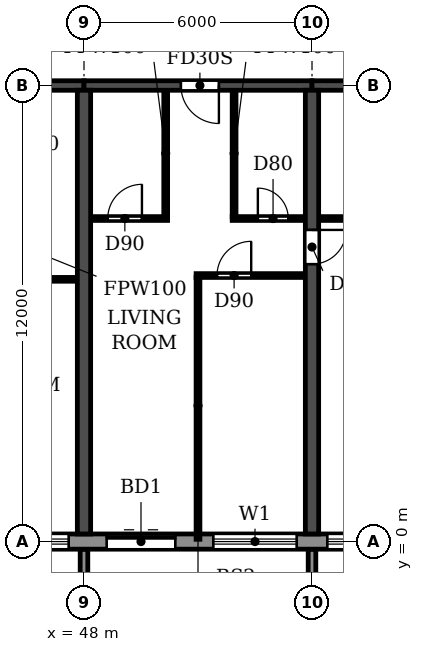
"""IFC4 building model, lengths in metres.
Left out: names, types, materials, properties, quantities, classifications, styles, units other than length and angle.
Written with IfcOpenShell. Run it as: python <this file> out.ifc"""

import sys

from ifc_helpers import new_model, si_unit, direction, frame, frame_2d, origin, place, context, subcontext, project, spatial, polyline, rectangle, outline, extrude, source, transform, mapped, element, fill, save


model = new_model("IFC4")
c1 = context("Model", 3, precision=1e-05, world=origin(), true_north=direction((0.0, 1.0)))
c2 = subcontext(c1, "Body", "Model", "MODEL_VIEW")
j1 = project(units=[si_unit("LENGTHUNIT", "METRE"), si_unit("PLANEANGLEUNIT", "RADIAN")], contexts=[c1])
p1 = place(None, origin())
s1 = spatial("IfcSite", under=j1, at=p1, CompositionType="ELEMENT")
p2 = place(p1, origin())
s2 = spatial("IfcBuilding", under=s1, at=p2, CompositionType="ELEMENT")
p3 = place(p2, frame((0.0, 0.0, 109.2)))
s3 = spatial("IfcBuildingStorey", under=s2, at=p3, CompositionType="ELEMENT", Elevation=109.2)
p4 = place(p3, frame((48.0, 0.2, 0.0), z_axis=(0.0, 0.0, 1.0), x_axis=(0.0, 1.0, 0.0)))
e1 = element("IfcWall", 1, at=p4, inside=s3, PredefinedType="SHEAR", context=c2, shape_type="SweptSolid", body=[
    extrude(rectangle(XDim=11.675, YDim=0.35, at=frame_2d((5.837, 0.0))), origin(), (0.0, 0.0, 1.0), 3.06),
])
p5 = place(p3, frame((54.0, 0.2, 0.0), z_axis=(0.0, 0.0, 1.0), x_axis=(0.0, 1.0, 0.0)))
e2 = element("IfcWall", 2, at=p5, inside=s3, PredefinedType="SHEAR", context=c2, shape_type="SweptSolid", body=[
    extrude(rectangle(XDim=11.675, YDim=0.35, at=frame_2d((5.837, 0.0))), origin(), (0.0, 0.0, 1.0), 3.06),
])
p6 = place(p5, frame((7.1, 0.0, 0.0)))
e3 = element("IfcOpeningElement", 3, at=p6, cuts=e2, PredefinedType="OPENING", context=c2, shape_type="SweptSolid", body=[
    extrude(rectangle(XDim=0.9, YDim=2.1, at=frame_2d((0.45, 1.05))), frame((0.0, 0.185, 0.0), z_axis=(0.0, -1.0, 0.0), x_axis=(1.0, 0.0, 0.0)), (0.0, 0.0, 1.0), 0.37),
])
p7 = place(p3, frame((42.0, 12.0, 0.0), z_axis=(0.0, 0.0, 1.0), x_axis=(1.0, 0.0, 0.0)))
e4 = element("IfcWall", 4, at=p7, inside=s3, PredefinedType="SHEAR", context=c2, shape_type="SweptSolid", body=[
    extrude(rectangle(XDim=6.0, YDim=0.25, at=frame_2d((3.0, 0.0))), origin(), (0.0, 0.0, 1.0), 2.46),
])
p8 = place(p7, frame((2.45, 0.0, 0.0)))
e5 = element("IfcOpeningElement", 5, at=p8, cuts=e4, PredefinedType="OPENING", context=c2, shape_type="SweptSolid", body=[
    extrude(rectangle(XDim=1.0, YDim=2.1, at=frame_2d((0.5, 1.05))), frame((0.0, 0.135, 0.0), z_axis=(0.0, -1.0, 0.0), x_axis=(1.0, 0.0, 0.0)), (0.0, 0.0, 1.0), 0.27),
])
p9 = place(p3, frame((48.0, 12.0, 0.0), z_axis=(0.0, 0.0, 1.0), x_axis=(1.0, 0.0, 0.0)))
e6 = element("IfcWall", 6, at=p9, inside=s3, PredefinedType="SHEAR", context=c2, shape_type="SweptSolid", body=[
    extrude(rectangle(XDim=6.0, YDim=0.25, at=frame_2d((3.0, 0.0))), origin(), (0.0, 0.0, 1.0), 2.46),
])
p10 = place(p9, frame((2.55, 0.0, 0.0)))
e7 = element("IfcOpeningElement", 7, at=p10, cuts=e6, PredefinedType="OPENING", context=c2, shape_type="SweptSolid", body=[
    extrude(rectangle(XDim=1.0, YDim=2.1, at=frame_2d((0.5, 1.05))), frame((0.0, 0.135, 0.0), z_axis=(0.0, -1.0, 0.0), x_axis=(1.0, 0.0, 0.0)), (0.0, 0.0, 1.0), 0.27),
])
p11 = place(p3, frame((54.0, 12.0, 0.0), z_axis=(0.0, 0.0, 1.0), x_axis=(1.0, 0.0, 0.0)))
e8 = element("IfcWall", 8, at=p11, inside=s3, PredefinedType="SHEAR", context=c2, shape_type="SweptSolid", body=[
    extrude(rectangle(XDim=6.0, YDim=0.25, at=frame_2d((3.0, 0.0))), origin(), (0.0, 0.0, 1.0), 2.46),
])
p12 = place(p3, frame((16.683, 0.0, 0.0), z_axis=(0.0, 0.0, 1.0), x_axis=(1.0, 0.0, 0.0)))
e9 = element("IfcWall", 9, at=p12, inside=s3, PredefinedType="STANDARD", context=c2, shape_type="SweptSolid", body=[
    extrude(rectangle(XDim=68.634, YDim=0.4, at=frame_2d((34.317, 0.0))), origin(), (0.0, 0.0, 1.0), 3.06),
])
p13 = place(p12, frame((1.717, 0.0, 0.9)))
e10 = element("IfcOpeningElement", 10, at=p13, cuts=e9, PredefinedType="OPENING", context=c2, shape_type="SweptSolid", body=[
    extrude(rectangle(XDim=2.2, YDim=1.5, at=frame_2d((1.1, 0.75))), frame((0.0, 0.21, 0.0), z_axis=(0.0, -1.0, 0.0), x_axis=(1.0, 0.0, 0.0)), (0.0, 0.0, 1.0), 0.42),
])
p14 = place(p12, frame((4.717, 0.0, 0.9)))
e11 = element("IfcOpeningElement", 11, at=p14, cuts=e9, PredefinedType="OPENING", context=c2, shape_type="SweptSolid", body=[
    extrude(rectangle(XDim=2.2, YDim=1.5, at=frame_2d((1.1, 0.75))), frame((0.0, 0.21, 0.0), z_axis=(0.0, -1.0, 0.0), x_axis=(1.0, 0.0, 0.0)), (0.0, 0.0, 1.0), 0.42),
])
p15 = place(p12, frame((7.717, 0.0, 0.9)))
e12 = element("IfcOpeningElement", 12, at=p15, cuts=e9, PredefinedType="OPENING", context=c2, shape_type="SweptSolid", body=[
    extrude(rectangle(XDim=2.2, YDim=1.5, at=frame_2d((1.1, 0.75))), frame((0.0, 0.21, 0.0), z_axis=(0.0, -1.0, 0.0), x_axis=(1.0, 0.0, 0.0)), (0.0, 0.0, 1.0), 0.42),
])
p16 = place(p12, frame((10.917, 0.0, 0.0)))
e13 = element("IfcOpeningElement", 13, at=p16, cuts=e9, PredefinedType="OPENING", context=c2, shape_type="SweptSolid", body=[
    extrude(rectangle(XDim=1.8, YDim=2.4, at=frame_2d((0.9, 1.2))), frame((0.0, 0.21, 0.0), z_axis=(0.0, -1.0, 0.0), x_axis=(1.0, 0.0, 0.0)), (0.0, 0.0, 1.0), 0.42),
])
p17 = place(p12, frame((13.717, 0.0, 0.9)))
e14 = element("IfcOpeningElement", 14, at=p17, cuts=e9, PredefinedType="OPENING", context=c2, shape_type="SweptSolid", body=[
    extrude(rectangle(XDim=2.2, YDim=1.5, at=frame_2d((1.1, 0.75))), frame((0.0, 0.21, 0.0), z_axis=(0.0, -1.0, 0.0), x_axis=(1.0, 0.0, 0.0)), (0.0, 0.0, 1.0), 0.42),
])
p18 = place(p12, frame((16.717, 0.0, 0.9)))
e15 = element("IfcOpeningElement", 15, at=p18, cuts=e9, PredefinedType="OPENING", context=c2, shape_type="SweptSolid", body=[
    extrude(rectangle(XDim=2.2, YDim=1.5, at=frame_2d((1.1, 0.75))), frame((0.0, 0.21, 0.0), z_axis=(0.0, -1.0, 0.0), x_axis=(1.0, 0.0, 0.0)), (0.0, 0.0, 1.0), 0.42),
])
p19 = place(p12, frame((19.717, 0.0, 0.9)))
e16 = element("IfcOpeningElement", 16, at=p19, cuts=e9, PredefinedType="OPENING", context=c2, shape_type="SweptSolid", body=[
    extrude(rectangle(XDim=2.2, YDim=1.5, at=frame_2d((1.1, 0.75))), frame((0.0, 0.21, 0.0), z_axis=(0.0, -1.0, 0.0), x_axis=(1.0, 0.0, 0.0)), (0.0, 0.0, 1.0), 0.42),
])
p20 = place(p12, frame((22.717, 0.0, 0.9)))
e17 = element("IfcOpeningElement", 17, at=p20, cuts=e9, PredefinedType="OPENING", context=c2, shape_type="SweptSolid", body=[
    extrude(rectangle(XDim=2.2, YDim=1.5, at=frame_2d((1.1, 0.75))), frame((0.0, 0.21, 0.0), z_axis=(0.0, -1.0, 0.0), x_axis=(1.0, 0.0, 0.0)), (0.0, 0.0, 1.0), 0.42),
])
p21 = place(p12, frame((25.717, 0.0, 0.9)))
e18 = element("IfcOpeningElement", 18, at=p21, cuts=e9, PredefinedType="OPENING", context=c2, shape_type="SweptSolid", body=[
    extrude(rectangle(XDim=2.2, YDim=1.5, at=frame_2d((1.1, 0.75))), frame((0.0, 0.21, 0.0), z_axis=(0.0, -1.0, 0.0), x_axis=(1.0, 0.0, 0.0)), (0.0, 0.0, 1.0), 0.42),
])
p22 = place(p12, frame((28.717, 0.0, 0.9)))
e19 = element("IfcOpeningElement", 19, at=p22, cuts=e9, PredefinedType="OPENING", context=c2, shape_type="SweptSolid", body=[
    extrude(rectangle(XDim=2.2, YDim=1.5, at=frame_2d((1.1, 0.75))), frame((0.0, 0.21, 0.0), z_axis=(0.0, -1.0, 0.0), x_axis=(1.0, 0.0, 0.0)), (0.0, 0.0, 1.0), 0.42),
])
p23 = place(p12, frame((31.917, 0.0, 0.0)))
e20 = element("IfcOpeningElement", 20, at=p23, cuts=e9, PredefinedType="OPENING", context=c2, shape_type="SweptSolid", body=[
    extrude(rectangle(XDim=1.8, YDim=2.4, at=frame_2d((0.9, 1.2))), frame((0.0, 0.21, 0.0), z_axis=(0.0, -1.0, 0.0), x_axis=(1.0, 0.0, 0.0)), (0.0, 0.0, 1.0), 0.42),
])
p24 = place(p12, frame((34.717, 0.0, 0.9)))
e21 = element("IfcOpeningElement", 21, at=p24, cuts=e9, PredefinedType="OPENING", context=c2, shape_type="SweptSolid", body=[
    extrude(rectangle(XDim=2.2, YDim=1.5, at=frame_2d((1.1, 0.75))), frame((0.0, 0.21, 0.0), z_axis=(0.0, -1.0, 0.0), x_axis=(1.0, 0.0, 0.0)), (0.0, 0.0, 1.0), 0.42),
])
p25 = place(p12, frame((37.717, 0.0, 0.9)))
e22 = element("IfcOpeningElement", 22, at=p25, cuts=e9, PredefinedType="OPENING", context=c2, shape_type="SweptSolid", body=[
    extrude(rectangle(XDim=2.2, YDim=1.5, at=frame_2d((1.1, 0.75))), frame((0.0, 0.21, 0.0), z_axis=(0.0, -1.0, 0.0), x_axis=(1.0, 0.0, 0.0)), (0.0, 0.0, 1.0), 0.42),
])
p26 = place(p12, frame((40.717, 0.0, 0.9)))
e23 = element("IfcOpeningElement", 23, at=p26, cuts=e9, PredefinedType="OPENING", context=c2, shape_type="SweptSolid", body=[
    extrude(rectangle(XDim=2.2, YDim=1.5, at=frame_2d((1.1, 0.75))), frame((0.0, 0.21, 0.0), z_axis=(0.0, -1.0, 0.0), x_axis=(1.0, 0.0, 0.0)), (0.0, 0.0, 1.0), 0.42),
])
p27 = place(p12, frame((43.717, 0.0, 0.9)))
e24 = element("IfcOpeningElement", 24, at=p27, cuts=e9, PredefinedType="OPENING", context=c2, shape_type="SweptSolid", body=[
    extrude(rectangle(XDim=2.2, YDim=1.5, at=frame_2d((1.1, 0.75))), frame((0.0, 0.21, 0.0), z_axis=(0.0, -1.0, 0.0), x_axis=(1.0, 0.0, 0.0)), (0.0, 0.0, 1.0), 0.42),
])
p28 = place(p12, frame((46.917, 0.0, 0.0)))
e25 = element("IfcOpeningElement", 25, at=p28, cuts=e9, PredefinedType="OPENING", context=c2, shape_type="SweptSolid", body=[
    extrude(rectangle(XDim=1.8, YDim=2.4, at=frame_2d((0.9, 1.2))), frame((0.0, 0.21, 0.0), z_axis=(0.0, -1.0, 0.0), x_axis=(1.0, 0.0, 0.0)), (0.0, 0.0, 1.0), 0.42),
])
p29 = place(p12, frame((49.717, 0.0, 0.9)))
e26 = element("IfcOpeningElement", 26, at=p29, cuts=e9, PredefinedType="OPENING", context=c2, shape_type="SweptSolid", body=[
    extrude(rectangle(XDim=2.2, YDim=1.5, at=frame_2d((1.1, 0.75))), frame((0.0, 0.21, 0.0), z_axis=(0.0, -1.0, 0.0), x_axis=(1.0, 0.0, 0.0)), (0.0, 0.0, 1.0), 0.42),
])
p30 = place(p12, frame((52.717, 0.0, 0.9)))
e27 = element("IfcOpeningElement", 27, at=p30, cuts=e9, PredefinedType="OPENING", context=c2, shape_type="SweptSolid", body=[
    extrude(rectangle(XDim=2.2, YDim=1.5, at=frame_2d((1.1, 0.75))), frame((0.0, 0.21, 0.0), z_axis=(0.0, -1.0, 0.0), x_axis=(1.0, 0.0, 0.0)), (0.0, 0.0, 1.0), 0.42),
])
p31 = place(p12, frame((55.717, 0.0, 0.9)))
e28 = element("IfcOpeningElement", 28, at=p31, cuts=e9, PredefinedType="OPENING", context=c2, shape_type="SweptSolid", body=[
    extrude(rectangle(XDim=2.2, YDim=1.5, at=frame_2d((1.1, 0.75))), frame((0.0, 0.21, 0.0), z_axis=(0.0, -1.0, 0.0), x_axis=(1.0, 0.0, 0.0)), (0.0, 0.0, 1.0), 0.42),
])
p32 = place(p12, frame((58.717, 0.0, 0.9)))
e29 = element("IfcOpeningElement", 29, at=p32, cuts=e9, PredefinedType="OPENING", context=c2, shape_type="SweptSolid", body=[
    extrude(rectangle(XDim=2.2, YDim=1.5, at=frame_2d((1.1, 0.75))), frame((0.0, 0.21, 0.0), z_axis=(0.0, -1.0, 0.0), x_axis=(1.0, 0.0, 0.0)), (0.0, 0.0, 1.0), 0.42),
])
p33 = place(p12, frame((61.717, 0.0, 0.9)))
e30 = element("IfcOpeningElement", 30, at=p33, cuts=e9, PredefinedType="OPENING", context=c2, shape_type="SweptSolid", body=[
    extrude(rectangle(XDim=2.2, YDim=1.5, at=frame_2d((1.1, 0.75))), frame((0.0, 0.21, 0.0), z_axis=(0.0, -1.0, 0.0), x_axis=(1.0, 0.0, 0.0)), (0.0, 0.0, 1.0), 0.42),
])
p34 = place(p12, frame((64.717, 0.0, 0.9)))
e31 = element("IfcOpeningElement", 31, at=p34, cuts=e9, PredefinedType="OPENING", context=c2, shape_type="SweptSolid", body=[
    extrude(rectangle(XDim=2.2, YDim=1.5, at=frame_2d((1.1, 0.75))), frame((0.0, 0.21, 0.0), z_axis=(0.0, -1.0, 0.0), x_axis=(1.0, 0.0, 0.0)), (0.0, 0.0, 1.0), 0.42),
])
m1 = source(origin(), c2, "Body", "SweptSolid", [
    extrude(outline(polyline([(0.0, 0.0), (0.2, 0.0), (0.2, 1.65), (0.0, 1.65), (0.0, 0.0)])), origin(), (0.0, 0.0, 1.0), 3.1),
])
for number, where in (
    (32, (47.9, -1.85, 0.0)),
    (33, (53.9, -1.85, 0.0)),
):
    element("IfcWall", number, at=place(p3, frame(where)), inside=s3, PredefinedType="STANDARD", context=c2, shape_type="MappedRepresentation", body=[
        mapped(m1, transform((0.0, 0.0, 0.0))),
    ])
p35 = place(p3, frame((45.8, 6.9, 0.0), z_axis=(0.0, 0.0, 1.0), x_axis=(1.0, 0.0, 0.0)))
e34 = element("IfcWall", 34, at=p35, inside=s3, PredefinedType="PARTITIONING", context=c2, shape_type="SweptSolid", body=[
    extrude(rectangle(XDim=2.015, YDim=0.1, at=frame_2d((1.007, 0.0))), origin(), (0.0, 0.0, 1.0), 3.06),
])
p36 = place(p3, frame((50.95, 7.0, 0.0), z_axis=(0.0, 0.0, 1.0), x_axis=(1.0, 0.0, 0.0)))
e35 = element("IfcWall", 35, at=p36, inside=s3, PredefinedType="PARTITIONING", context=c2, shape_type="SweptSolid", body=[
    extrude(rectangle(XDim=2.865, YDim=0.1, at=frame_2d((1.433, 0.0))), origin(), (0.0, 0.0, 1.0), 3.06),
])
p37 = place(p36, frame((0.55, 0.0, 0.0)))
e36 = element("IfcOpeningElement", 36, at=p37, cuts=e35, PredefinedType="OPENING", context=c2, shape_type="SweptSolid", body=[
    extrude(rectangle(XDim=0.9, YDim=2.1, at=frame_2d((0.45, 1.05))), frame((0.0, 0.06, 0.0), z_axis=(0.0, -1.0, 0.0), x_axis=(1.0, 0.0, 0.0)), (0.0, 0.0, 1.0), 0.12),
])
p38 = place(p3, frame((48.185, 8.5, 0.0), z_axis=(0.0, 0.0, 1.0), x_axis=(1.0, 0.0, 0.0)))
e37 = element("IfcWall", 37, at=p38, inside=s3, PredefinedType="PARTITIONING", context=c2, shape_type="SweptSolid", body=[
    extrude(rectangle(XDim=2.015, YDim=0.1, at=frame_2d((1.007, 0.0))), origin(), (0.0, 0.0, 1.0), 3.06),
])
p39 = place(p38, frame((0.44, 0.0, 0.0)))
e38 = element("IfcOpeningElement", 38, at=p39, cuts=e37, PredefinedType="OPENING", context=c2, shape_type="SweptSolid", body=[
    extrude(rectangle(XDim=0.9, YDim=2.1, at=frame_2d((0.45, 1.05))), frame((0.0, 0.06, 0.0), z_axis=(0.0, -1.0, 0.0), x_axis=(1.0, 0.0, 0.0)), (0.0, 0.0, 1.0), 0.12),
])
p40 = place(p3, frame((51.9, 8.5, 0.0), z_axis=(0.0, 0.0, 1.0), x_axis=(1.0, 0.0, 0.0)))
e39 = element("IfcWall", 39, at=p40, inside=s3, PredefinedType="PARTITIONING", context=c2, shape_type="SweptSolid", body=[
    extrude(rectangle(XDim=1.915, YDim=0.1, at=frame_2d((0.958, 0.0))), origin(), (0.0, 0.0, 1.0), 3.06),
])
p41 = place(p40, frame((0.675, 0.0, 0.0)))
e40 = element("IfcOpeningElement", 40, at=p41, cuts=e39, PredefinedType="OPENING", context=c2, shape_type="SweptSolid", body=[
    extrude(rectangle(XDim=0.8, YDim=2.1, at=frame_2d((0.4, 1.05))), frame((0.0, 0.06, 0.0), z_axis=(0.0, -1.0, 0.0), x_axis=(1.0, 0.0, 0.0)), (0.0, 0.0, 1.0), 0.12),
])
p42 = place(p3, frame((54.185, 8.5, 0.0), z_axis=(0.0, 0.0, 1.0), x_axis=(1.0, 0.0, 0.0)))
e41 = element("IfcWall", 41, at=p42, inside=s3, PredefinedType="PARTITIONING", context=c2, shape_type="SweptSolid", body=[
    extrude(rectangle(XDim=2.715, YDim=0.1, at=frame_2d((1.357, 0.0))), origin(), (0.0, 0.0, 1.0), 3.06),
])
p43 = place(p42, frame((0.915, 0.0, 0.0)))
e42 = element("IfcOpeningElement", 42, at=p43, cuts=e41, PredefinedType="OPENING", context=c2, shape_type="SweptSolid", body=[
    extrude(rectangle(XDim=0.8, YDim=2.1, at=frame_2d((0.4, 1.05))), frame((0.0, 0.06, 0.0), z_axis=(0.0, -1.0, 0.0), x_axis=(1.0, 0.0, 0.0)), (0.0, 0.0, 1.0), 0.12),
])
p44 = place(p3, frame((50.15, 8.55, 0.0), z_axis=(0.0, 0.0, 1.0), x_axis=(0.0, 1.0, 0.0)))
e43 = element("IfcWall", 43, at=p44, inside=s3, PredefinedType="PARTITIONING", context=c2, shape_type="SweptSolid", body=[
    extrude(rectangle(XDim=3.315, YDim=0.1, at=frame_2d((1.657, 0.0))), origin(), (0.0, 0.0, 1.0), 3.06),
])
p45 = place(p3, frame((51.0, 0.06, 0.0), z_axis=(0.0, 0.0, 1.0), x_axis=(0.0, 1.0, 0.0)))
e44 = element("IfcWall", 44, at=p45, inside=s3, PredefinedType="PARTITIONING", context=c2, shape_type="SweptSolid", body=[
    extrude(rectangle(XDim=6.89, YDim=0.1, at=frame_2d((3.445, 0.0))), origin(), (0.0, 0.0, 1.0), 3.06),
])
p46 = place(p3, frame((51.95, 8.55, 0.0), z_axis=(0.0, 0.0, 1.0), x_axis=(0.0, 1.0, 0.0)))
e45 = element("IfcWall", 45, at=p46, inside=s3, PredefinedType="PARTITIONING", context=c2, shape_type="SweptSolid", body=[
    extrude(rectangle(XDim=3.315, YDim=0.1, at=frame_2d((1.657, 0.0))), origin(), (0.0, 0.0, 1.0), 3.06),
])
p47 = place(p22, origin())
e46 = element("IfcWindow", 46, at=p47, inside=s3, PartitioningType="DOUBLE_PANEL_HORIZONTAL", PredefinedType="WINDOW", context=c2, shape_type="SweptSolid", body=[
    extrude(rectangle(XDim=2.2, YDim=1.5, at=frame_2d((1.1, 0.75))), frame((0.0, 0.03, 0.0), z_axis=(0.0, -1.0, 0.0), x_axis=(1.0, 0.0, 0.0)), (0.0, 0.0, 1.0), 0.06),
])
fill(e19, e46)
p48 = place(p23, origin())
e47 = element("IfcDoor", 47, at=p48, inside=s3, OperationType="DOUBLE_DOOR_SLIDING", PredefinedType="DOOR", context=c2, shape_type="SweptSolid", body=[
    extrude(rectangle(XDim=1.8, YDim=2.4, at=frame_2d((0.9, 1.2))), frame((0.0, 0.025, 0.0), z_axis=(0.0, -1.0, 0.0), x_axis=(1.0, 0.0, 0.0)), (0.0, 0.0, 1.0), 0.05),
])
fill(e20, e47)
p49 = place(p24, origin())
e48 = element("IfcWindow", 48, at=p49, inside=s3, PartitioningType="DOUBLE_PANEL_HORIZONTAL", PredefinedType="WINDOW", context=c2, shape_type="SweptSolid", body=[
    extrude(rectangle(XDim=2.2, YDim=1.5, at=frame_2d((1.1, 0.75))), frame((0.0, 0.03, 0.0), z_axis=(0.0, -1.0, 0.0), x_axis=(1.0, 0.0, 0.0)), (0.0, 0.0, 1.0), 0.06),
])
fill(e21, e48)
p50 = place(p25, origin())
e49 = element("IfcWindow", 49, at=p50, inside=s3, PartitioningType="DOUBLE_PANEL_HORIZONTAL", PredefinedType="WINDOW", context=c2, shape_type="SweptSolid", body=[
    extrude(rectangle(XDim=2.2, YDim=1.5, at=frame_2d((1.1, 0.75))), frame((0.0, 0.03, 0.0), z_axis=(0.0, -1.0, 0.0), x_axis=(1.0, 0.0, 0.0)), (0.0, 0.0, 1.0), 0.06),
])
fill(e22, e49)
p51 = place(p39, origin())
e50 = element("IfcDoor", 50, at=p51, inside=s3, OperationType="SINGLE_SWING_RIGHT", PredefinedType="DOOR", context=c2, shape_type="SweptSolid", body=[
    extrude(rectangle(XDim=0.9, YDim=2.1, at=frame_2d((0.45, 1.05))), frame((0.0, 0.025, 0.0), z_axis=(0.0, -1.0, 0.0), x_axis=(1.0, 0.0, 0.0)), (0.0, 0.0, 1.0), 0.05),
])
fill(e38, e50)
p52 = place(p10, frame((1.0, 0.0, 0.0), z_axis=(0.0, 0.0, 1.0), x_axis=(-1.0, 0.0, 0.0)))
e51 = element("IfcDoor", 51, at=p52, inside=s3, OperationType="SINGLE_SWING_LEFT", PredefinedType="DOOR", context=c2, shape_type="SweptSolid", body=[
    extrude(rectangle(XDim=1.0, YDim=2.1, at=frame_2d((0.5, 1.05))), frame((0.0, 0.025, 0.0), z_axis=(0.0, -1.0, 0.0), x_axis=(1.0, 0.0, 0.0)), (0.0, 0.0, 1.0), 0.05),
])
fill(e7, e51)
p53 = place(p37, origin())
e52 = element("IfcDoor", 52, at=p53, inside=s3, OperationType="SINGLE_SWING_RIGHT", PredefinedType="DOOR", context=c2, shape_type="SweptSolid", body=[
    extrude(rectangle(XDim=0.9, YDim=2.1, at=frame_2d((0.45, 1.05))), frame((0.0, 0.025, 0.0), z_axis=(0.0, -1.0, 0.0), x_axis=(1.0, 0.0, 0.0)), (0.0, 0.0, 1.0), 0.05),
])
fill(e36, e52)
p54 = place(p41, origin())
e53 = element("IfcDoor", 53, at=p54, inside=s3, OperationType="SINGLE_SWING_LEFT", PredefinedType="DOOR", context=c2, shape_type="SweptSolid", body=[
    extrude(rectangle(XDim=0.8, YDim=2.1, at=frame_2d((0.4, 1.05))), frame((0.0, 0.025, 0.0), z_axis=(0.0, -1.0, 0.0), x_axis=(1.0, 0.0, 0.0)), (0.0, 0.0, 1.0), 0.05),
])
fill(e40, e53)
p55 = place(p6, frame((0.9, 0.0, 0.0), z_axis=(0.0, 0.0, 1.0), x_axis=(-1.0, 0.0, 0.0)))
e54 = element("IfcDoor", 54, at=p55, inside=s3, OperationType="SINGLE_SWING_LEFT", PredefinedType="DOOR", context=c2, shape_type="SweptSolid", body=[
    extrude(rectangle(XDim=0.9, YDim=2.1, at=frame_2d((0.45, 1.05))), frame((0.0, 0.025, 0.0), z_axis=(0.0, -1.0, 0.0), x_axis=(1.0, 0.0, 0.0)), (0.0, 0.0, 1.0), 0.05),
])
fill(e3, e54)
save(model, sys.argv[1])
